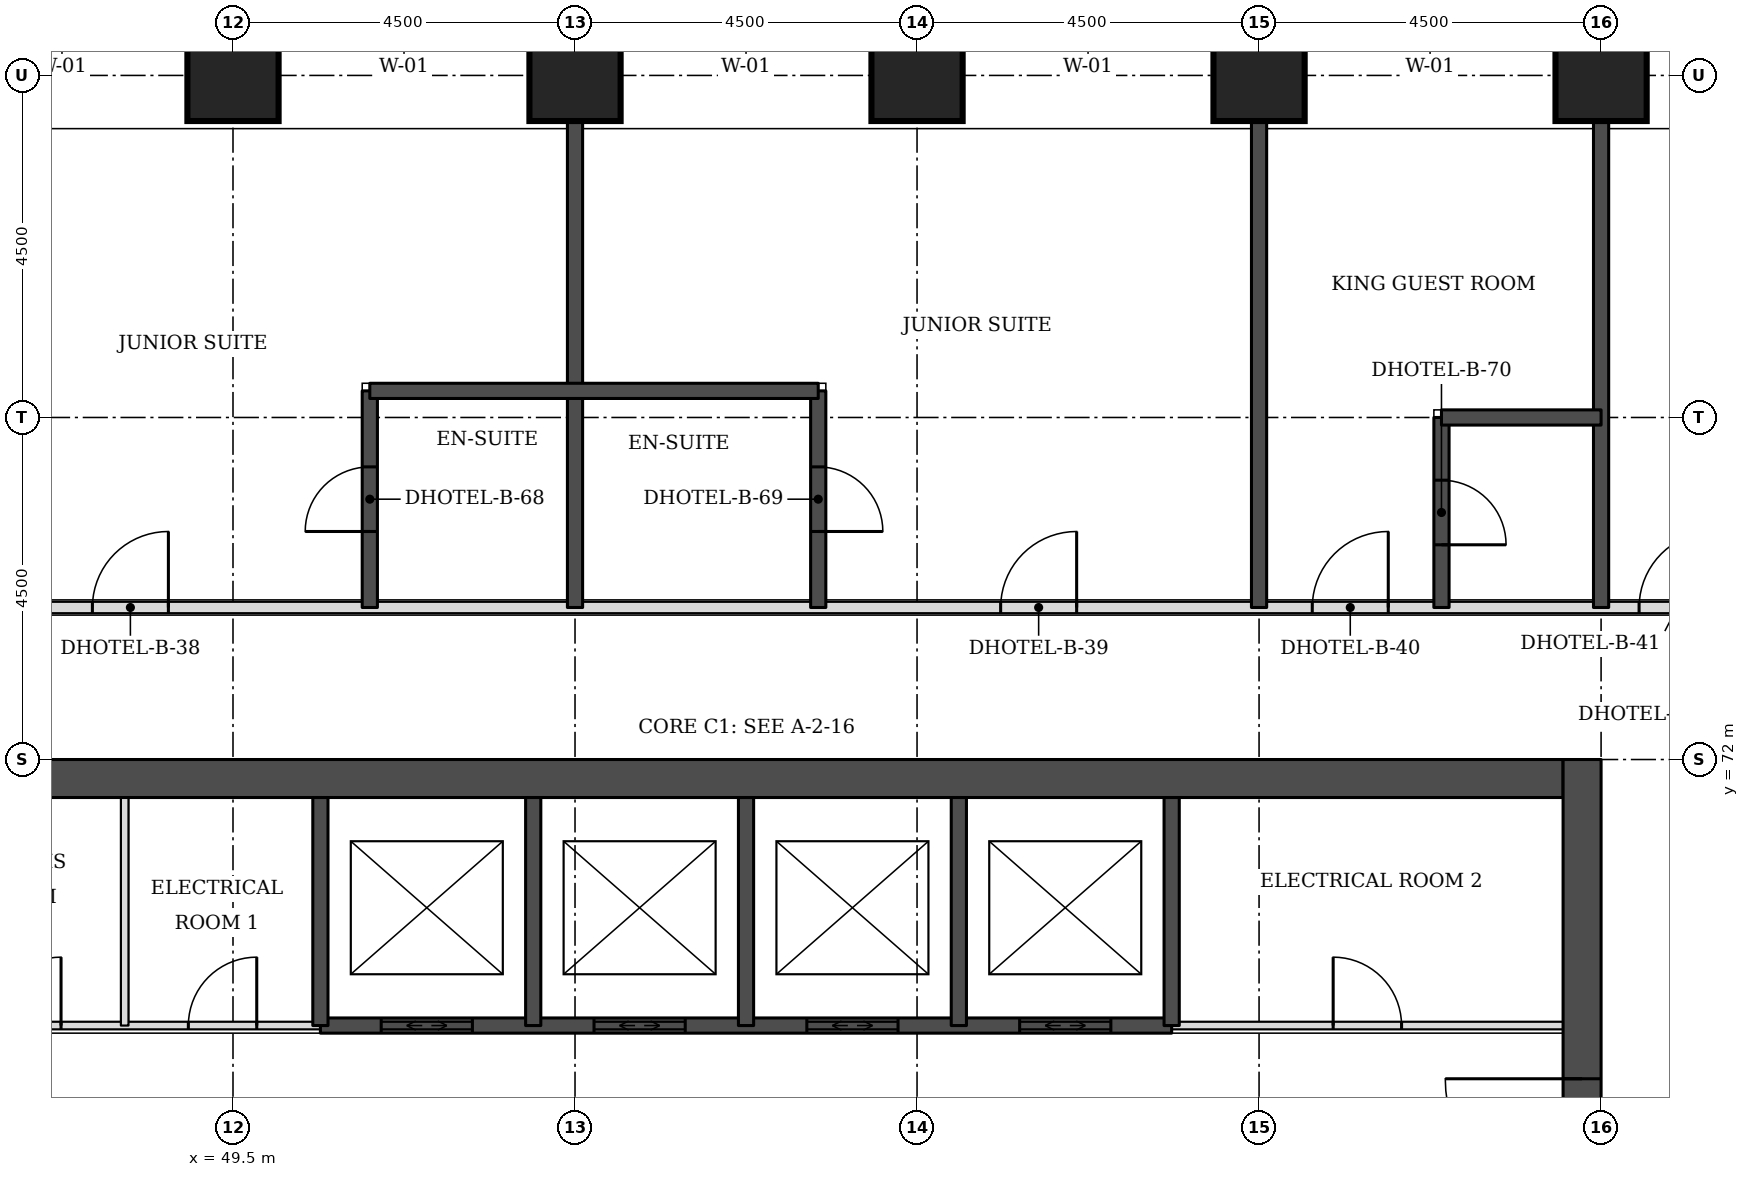
"""IFC4 building model, lengths in metres.
Left out: names, types, materials, properties, quantities, classifications, styles, units other than length and angle.
Written with IfcOpenShell. Run it as: python <this file> out.ifc"""

import sys

from ifc_helpers import new_model, si_unit, direction, frame, frame_2d, origin, origin_2d, place, context, subcontext, project, spatial, rectangle, extrude, element, fill, save


model = new_model("IFC4")
c1 = context("Model", 3, precision=1e-05, world=origin(), true_north=direction((0.0, 1.0)))
c2 = subcontext(c1, "Body", "Model", "MODEL_VIEW")
j1 = project(units=[si_unit("LENGTHUNIT", "METRE"), si_unit("PLANEANGLEUNIT", "RADIAN")], contexts=[c1])
p1 = place(None, origin())
s1 = spatial("IfcSite", under=j1, at=p1, CompositionType="ELEMENT")
p2 = place(p1, origin())
s2 = spatial("IfcBuilding", under=s1, at=p2, CompositionType="ELEMENT")
p3 = place(p2, frame((0.0, 0.0, 52.8)))
s3 = spatial("IfcBuildingStorey", under=s2, at=p3, CompositionType="ELEMENT", Elevation=52.8)
for number, where, z_axis, x_axis in (
    (1, (49.5, 81.0, 0.0), (0.0, 0.0, 1.0), (1.0, 0.0, 0.0)),
    (2, (54.0, 81.0, 0.0), (0.0, 0.0, 1.0), (1.0, 0.0, 0.0)),
    (3, (58.5, 81.0, 0.0), (0.0, 0.0, 1.0), (1.0, 0.0, 0.0)),
    (4, (63.0, 81.0, 0.0), (0.0, 0.0, 1.0), (1.0, 0.0, 0.0)),
    (5, (67.5, 81.0, 0.0), (0.0, 0.0, 1.0), (1.0, 0.0, 0.0)),
):
    element("IfcColumn", number, at=place(p3, frame(where, z_axis=z_axis, x_axis=x_axis)), inside=s3, PredefinedType="COLUMN", context=c2, shape_type="SweptSolid", body=[
        extrude(rectangle(XDim=1.2, YDim=1.2, at=origin_2d()), origin(), (0.0, 0.0, 1.0), 3.3),
    ])
p4 = place(p3, frame((45.5, 71.75, 0.0), z_axis=(0.0, 0.0, 1.0), x_axis=(1.0, 0.0, 0.0)))
e6 = element("IfcWall", 6, at=p4, inside=s3, PredefinedType="SHEAR", context=c2, shape_type="SweptSolid", body=[
    extrude(rectangle(XDim=21.5, YDim=0.5, at=frame_2d((10.75, 0.0))), origin(), (0.0, 0.0, 1.0), 3.3),
])
p5 = place(p3, frame((67.25, 49.5, 0.0), z_axis=(0.0, 0.0, 1.0), x_axis=(0.0, 1.0, 0.0)))
e7 = element("IfcWall", 7, at=p5, inside=s3, PredefinedType="SHEAR", context=c2, shape_type="SweptSolid", body=[
    extrude(rectangle(XDim=22.5, YDim=0.5, at=frame_2d((11.25, 0.0))), origin(), (0.0, 0.0, 1.0), 3.3),
])
p6 = place(p5, frame((4.2, 0.0, 0.0)))
e8 = element("IfcOpeningElement", 8, at=p6, cuts=e7, PredefinedType="OPENING", context=c2, shape_type="SweptSolid", body=[
    extrude(rectangle(XDim=1.8, YDim=2.1, at=frame_2d((0.9, 1.05))), frame((0.0, 0.26, 0.0), z_axis=(0.0, -1.0, 0.0), x_axis=(1.0, 0.0, 0.0)), (0.0, 0.0, 1.0), 0.52),
])
p7 = place(p5, frame((6.9, 0.0, 0.0)))
e9 = element("IfcOpeningElement", 9, at=p7, cuts=e7, PredefinedType="OPENING", context=c2, shape_type="SweptSolid", body=[
    extrude(rectangle(XDim=1.1, YDim=2.1, at=frame_2d((0.55, 1.05))), frame((0.0, 0.26, 0.0), z_axis=(0.0, -1.0, 0.0), x_axis=(1.0, 0.0, 0.0)), (0.0, 0.0, 1.0), 0.52),
])
p8 = place(p5, frame((13.6, 0.0, 0.0)))
e10 = element("IfcOpeningElement", 10, at=p8, cuts=e7, PredefinedType="OPENING", context=c2, shape_type="SweptSolid", body=[
    extrude(rectangle(XDim=1.1, YDim=2.1, at=frame_2d((0.55, 1.05))), frame((0.0, 0.26, 0.0), z_axis=(0.0, -1.0, 0.0), x_axis=(1.0, 0.0, 0.0)), (0.0, 0.0, 1.0), 0.52),
])
p9 = place(p5, frame((16.5, 0.0, 0.0)))
e11 = element("IfcOpeningElement", 11, at=p9, cuts=e7, PredefinedType="OPENING", context=c2, shape_type="SweptSolid", body=[
    extrude(rectangle(XDim=1.8, YDim=2.1, at=frame_2d((0.9, 1.05))), frame((0.0, 0.26, 0.0), z_axis=(0.0, -1.0, 0.0), x_axis=(1.0, 0.0, 0.0)), (0.0, 0.0, 1.0), 0.52),
])
p10 = place(p3, frame((43.0, 74.0, 0.0), z_axis=(0.0, 0.0, 1.0), x_axis=(1.0, 0.0, 0.0)))
e12 = element("IfcWall", 12, at=p10, inside=s3, PredefinedType="PARTITIONING", context=c2, shape_type="SweptSolid", body=[
    extrude(rectangle(XDim=26.5, YDim=0.15, at=frame_2d((13.25, 0.0))), origin(), (0.0, 0.0, 1.0), 3.08),
])
p11 = place(p10, frame((4.65, 0.0, 0.0)))
e13 = element("IfcOpeningElement", 13, at=p11, cuts=e12, PredefinedType="OPENING", context=c2, shape_type="SweptSolid", body=[
    extrude(rectangle(XDim=1.0, YDim=2.1, at=frame_2d((0.5, 1.05))), frame((0.0, 0.085, 0.0), z_axis=(0.0, -1.0, 0.0), x_axis=(1.0, 0.0, 0.0)), (0.0, 0.0, 1.0), 0.17),
])
p12 = place(p10, frame((16.6, 0.0, 0.0)))
e14 = element("IfcOpeningElement", 14, at=p12, cuts=e12, PredefinedType="OPENING", context=c2, shape_type="SweptSolid", body=[
    extrude(rectangle(XDim=1.0, YDim=2.1, at=frame_2d((0.5, 1.05))), frame((0.0, 0.085, 0.0), z_axis=(0.0, -1.0, 0.0), x_axis=(1.0, 0.0, 0.0)), (0.0, 0.0, 1.0), 0.17),
])
p13 = place(p10, frame((20.7, 0.0, 0.0)))
e15 = element("IfcOpeningElement", 15, at=p13, cuts=e12, PredefinedType="OPENING", context=c2, shape_type="SweptSolid", body=[
    extrude(rectangle(XDim=1.0, YDim=2.1, at=frame_2d((0.5, 1.05))), frame((0.0, 0.085, 0.0), z_axis=(0.0, -1.0, 0.0), x_axis=(1.0, 0.0, 0.0)), (0.0, 0.0, 1.0), 0.17),
])
p14 = place(p10, frame((0.5, 0.0, 0.0)))
e16 = element("IfcOpeningElement", 16, at=p14, cuts=e12, PredefinedType="OPENING", context=c2, shape_type="SweptSolid", body=[
    extrude(rectangle(XDim=1.0, YDim=2.1, at=frame_2d((0.5, 1.05))), frame((0.0, 0.085, 0.0), z_axis=(0.0, -1.0, 0.0), x_axis=(1.0, 0.0, 0.0)), (0.0, 0.0, 1.0), 0.17),
])
p15 = place(p10, frame((25.0, 0.0, 0.0)))
e17 = element("IfcOpeningElement", 17, at=p15, cuts=e12, PredefinedType="OPENING", context=c2, shape_type="SweptSolid", body=[
    extrude(rectangle(XDim=1.0, YDim=2.1, at=frame_2d((0.5, 1.05))), frame((0.0, 0.085, 0.0), z_axis=(0.0, -1.0, 0.0), x_axis=(1.0, 0.0, 0.0)), (0.0, 0.0, 1.0), 0.17),
])
p16 = place(p3, frame((51.3, 74.0, 0.0), z_axis=(0.0, 0.0, 1.0), x_axis=(0.0, 1.0, 0.0)))
e18 = element("IfcWall", 18, at=p16, inside=s3, PredefinedType="SOLIDWALL", context=c2, shape_type="SweptSolid", body=[
    extrude(rectangle(XDim=2.85, YDim=0.2, at=frame_2d((1.425, 0.0))), origin(), (0.0, 0.0, 1.0), 3.08),
])
p17 = place(p16, frame((1.0, 0.0, 0.0)))
e19 = element("IfcOpeningElement", 19, at=p17, cuts=e18, PredefinedType="OPENING", context=c2, shape_type="SweptSolid", body=[
    extrude(rectangle(XDim=0.85, YDim=2.1, at=frame_2d((0.425, 1.05))), frame((0.0, 0.11, 0.0), z_axis=(0.0, -1.0, 0.0), x_axis=(1.0, 0.0, 0.0)), (0.0, 0.0, 1.0), 0.22),
])
p18 = place(p3, frame((54.0, 74.0, 0.0), z_axis=(0.0, 0.0, 1.0), x_axis=(0.0, 1.0, 0.0)))
e20 = element("IfcWall", 20, at=p18, inside=s3, PredefinedType="SOLIDWALL", context=c2, shape_type="SweptSolid", body=[
    extrude(rectangle(XDim=6.4, YDim=0.2, at=frame_2d((3.2, 0.0))), origin(), (0.0, 0.0, 1.0), 3.08),
])
p19 = place(p3, frame((57.2, 74.0, 0.0), z_axis=(0.0, 0.0, 1.0), x_axis=(0.0, 1.0, 0.0)))
e21 = element("IfcWall", 21, at=p19, inside=s3, PredefinedType="SOLIDWALL", context=c2, shape_type="SweptSolid", body=[
    extrude(rectangle(XDim=2.85, YDim=0.2, at=frame_2d((1.425, 0.0))), origin(), (0.0, 0.0, 1.0), 3.08),
])
p20 = place(p19, frame((1.0, 0.0, 0.0)))
e22 = element("IfcOpeningElement", 22, at=p20, cuts=e21, PredefinedType="OPENING", context=c2, shape_type="SweptSolid", body=[
    extrude(rectangle(XDim=0.85, YDim=2.1, at=frame_2d((0.425, 1.05))), frame((0.0, 0.11, 0.0), z_axis=(0.0, -1.0, 0.0), x_axis=(1.0, 0.0, 0.0)), (0.0, 0.0, 1.0), 0.22),
])
p21 = place(p3, frame((63.0, 74.0, 0.0), z_axis=(0.0, 0.0, 1.0), x_axis=(0.0, 1.0, 0.0)))
e23 = element("IfcWall", 23, at=p21, inside=s3, PredefinedType="SOLIDWALL", context=c2, shape_type="SweptSolid", body=[
    extrude(rectangle(XDim=6.4, YDim=0.2, at=frame_2d((3.2, 0.0))), origin(), (0.0, 0.0, 1.0), 3.08),
])
p22 = place(p3, frame((65.4, 74.0, 0.0), z_axis=(0.0, 0.0, 1.0), x_axis=(0.0, 1.0, 0.0)))
e24 = element("IfcWall", 24, at=p22, inside=s3, PredefinedType="SOLIDWALL", context=c2, shape_type="SweptSolid", body=[
    extrude(rectangle(XDim=2.5, YDim=0.2, at=frame_2d((1.25, 0.0))), origin(), (0.0, 0.0, 1.0), 3.08),
])
p23 = place(p22, frame((0.825, 0.0, 0.0)))
e25 = element("IfcOpeningElement", 25, at=p23, cuts=e24, PredefinedType="OPENING", context=c2, shape_type="SweptSolid", body=[
    extrude(rectangle(XDim=0.85, YDim=2.1, at=frame_2d((0.425, 1.05))), frame((0.0, 0.11, 0.0), z_axis=(0.0, -1.0, 0.0), x_axis=(1.0, 0.0, 0.0)), (0.0, 0.0, 1.0), 0.22),
])
p24 = place(p3, frame((67.5, 74.0, 0.0), z_axis=(0.0, 0.0, 1.0), x_axis=(0.0, 1.0, 0.0)))
e26 = element("IfcWall", 26, at=p24, inside=s3, PredefinedType="SOLIDWALL", context=c2, shape_type="SweptSolid", body=[
    extrude(rectangle(XDim=6.4, YDim=0.2, at=frame_2d((3.2, 0.0))), origin(), (0.0, 0.0, 1.0), 3.08),
])
p25 = place(p3, frame((65.4, 76.5, 0.0), z_axis=(0.0, 0.0, 1.0), x_axis=(1.0, 0.0, 0.0)))
e27 = element("IfcWall", 27, at=p25, inside=s3, PredefinedType="SOLIDWALL", context=c2, shape_type="SweptSolid", body=[
    extrude(rectangle(XDim=2.1, YDim=0.2, at=frame_2d((1.05, 0.0))), origin(), (0.0, 0.0, 1.0), 3.08),
])
p26 = place(p3, frame((51.3, 76.85, 0.0), z_axis=(0.0, 0.0, 1.0), x_axis=(1.0, 0.0, 0.0)))
e28 = element("IfcWall", 28, at=p26, inside=s3, PredefinedType="SOLIDWALL", context=c2, shape_type="SweptSolid", body=[
    extrude(rectangle(XDim=5.9, YDim=0.2, at=frame_2d((2.95, 0.0))), origin(), (0.0, 0.0, 1.0), 3.08),
])
p27 = place(p3, frame((45.5, 68.5, 0.0), z_axis=(0.0, 0.0, 1.0), x_axis=(1.0, 0.0, 0.0)))
e29 = element("IfcWall", 29, at=p27, inside=s3, PredefinedType="PARTITIONING", context=c2, shape_type="SweptSolid", body=[
    extrude(rectangle(XDim=5.15, YDim=0.1, at=frame_2d((2.575, 0.0))), origin(), (0.0, 0.0, 1.0), 3.08),
])
p28 = place(p27, frame((0.837, 0.0, 0.0)))
e30 = element("IfcOpeningElement", 30, at=p28, cuts=e29, PredefinedType="OPENING", context=c2, shape_type="SweptSolid", body=[
    extrude(rectangle(XDim=0.9, YDim=2.1, at=frame_2d((0.45, 1.05))), frame((0.0, 0.06, 0.0), z_axis=(0.0, -1.0, 0.0), x_axis=(1.0, 0.0, 0.0)), (0.0, 0.0, 1.0), 0.12),
])
p29 = place(p27, frame((3.413, 0.0, 0.0)))
e31 = element("IfcOpeningElement", 31, at=p29, cuts=e29, PredefinedType="OPENING", context=c2, shape_type="SweptSolid", body=[
    extrude(rectangle(XDim=0.9, YDim=2.1, at=frame_2d((0.45, 1.05))), frame((0.0, 0.06, 0.0), z_axis=(0.0, -1.0, 0.0), x_axis=(1.0, 0.0, 0.0)), (0.0, 0.0, 1.0), 0.12),
])
p30 = place(p3, frame((61.85, 68.5, 0.0), z_axis=(0.0, 0.0, 1.0), x_axis=(1.0, 0.0, 0.0)))
e32 = element("IfcWall", 32, at=p30, inside=s3, PredefinedType="PARTITIONING", context=c2, shape_type="SweptSolid", body=[
    extrude(rectangle(XDim=5.15, YDim=0.1, at=frame_2d((2.575, 0.0))), origin(), (0.0, 0.0, 1.0), 3.08),
])
p31 = place(p30, frame((2.125, 0.0, 0.0)))
e33 = element("IfcOpeningElement", 33, at=p31, cuts=e32, PredefinedType="OPENING", context=c2, shape_type="SweptSolid", body=[
    extrude(rectangle(XDim=0.9, YDim=2.1, at=frame_2d((0.45, 1.05))), frame((0.0, 0.06, 0.0), z_axis=(0.0, -1.0, 0.0), x_axis=(1.0, 0.0, 0.0)), (0.0, 0.0, 1.0), 0.12),
])
p32 = place(p3, frame((50.65, 68.5, 0.0), z_axis=(0.0, 0.0, 1.0), x_axis=(1.0, 0.0, 0.0)))
e34 = element("IfcWall", 34, at=p32, inside=s3, PredefinedType="SOLIDWALL", context=c2, shape_type="SweptSolid", body=[
    extrude(rectangle(XDim=11.2, YDim=0.2, at=frame_2d((5.6, 0.0))), origin(), (0.0, 0.0, 1.0), 3.08),
])
p33 = place(p32, frame((0.8, 0.0, 0.0)))
e35 = element("IfcOpeningElement", 35, at=p33, cuts=e34, PredefinedType="OPENING", context=c2, shape_type="SweptSolid", body=[
    extrude(rectangle(XDim=1.2, YDim=2.1, at=frame_2d((0.6, 1.05))), frame((0.0, 0.11, 0.0), z_axis=(0.0, -1.0, 0.0), x_axis=(1.0, 0.0, 0.0)), (0.0, 0.0, 1.0), 0.22),
])
p34 = place(p32, frame((3.6, 0.0, 0.0)))
e36 = element("IfcOpeningElement", 36, at=p34, cuts=e34, PredefinedType="OPENING", context=c2, shape_type="SweptSolid", body=[
    extrude(rectangle(XDim=1.2, YDim=2.1, at=frame_2d((0.6, 1.05))), frame((0.0, 0.11, 0.0), z_axis=(0.0, -1.0, 0.0), x_axis=(1.0, 0.0, 0.0)), (0.0, 0.0, 1.0), 0.22),
])
p35 = place(p32, frame((6.4, 0.0, 0.0)))
e37 = element("IfcOpeningElement", 37, at=p35, cuts=e34, PredefinedType="OPENING", context=c2, shape_type="SweptSolid", body=[
    extrude(rectangle(XDim=1.2, YDim=2.1, at=frame_2d((0.6, 1.05))), frame((0.0, 0.11, 0.0), z_axis=(0.0, -1.0, 0.0), x_axis=(1.0, 0.0, 0.0)), (0.0, 0.0, 1.0), 0.22),
])
p36 = place(p32, frame((9.2, 0.0, 0.0)))
e38 = element("IfcOpeningElement", 38, at=p36, cuts=e34, PredefinedType="OPENING", context=c2, shape_type="SweptSolid", body=[
    extrude(rectangle(XDim=1.2, YDim=2.1, at=frame_2d((0.6, 1.05))), frame((0.0, 0.11, 0.0), z_axis=(0.0, -1.0, 0.0), x_axis=(1.0, 0.0, 0.0)), (0.0, 0.0, 1.0), 0.22),
])
p37 = place(p3, frame((48.075, 68.5, 0.0), z_axis=(0.0, 0.0, 1.0), x_axis=(0.0, 1.0, 0.0)))
e39 = element("IfcWall", 39, at=p37, inside=s3, PredefinedType="PARTITIONING", context=c2, shape_type="SweptSolid", body=[
    extrude(rectangle(XDim=3.0, YDim=0.1, at=frame_2d((1.5, 0.0))), origin(), (0.0, 0.0, 1.0), 3.08),
])
for number, where, z_axis, x_axis in (
    (40, (50.65, 68.5, 0.0), (0.0, 0.0, 1.0), (0.0, 1.0, 0.0)),
    (41, (53.45, 68.5, 0.0), (0.0, 0.0, 1.0), (0.0, 1.0, 0.0)),
    (42, (56.25, 68.5, 0.0), (0.0, 0.0, 1.0), (0.0, 1.0, 0.0)),
    (43, (59.05, 68.5, 0.0), (0.0, 0.0, 1.0), (0.0, 1.0, 0.0)),
    (44, (61.85, 68.5, 0.0), (0.0, 0.0, 1.0), (0.0, 1.0, 0.0)),
):
    element("IfcWall", number, at=place(p3, frame(where, z_axis=z_axis, x_axis=x_axis)), inside=s3, PredefinedType="SOLIDWALL", context=c2, shape_type="SweptSolid", body=[
        extrude(rectangle(XDim=3.0, YDim=0.2, at=frame_2d((1.5, 0.0))), origin(), (0.0, 0.0, 1.0), 3.08),
    ])
p38 = place(p11, origin())
e45 = element("IfcDoor", 45, at=p38, inside=s3, OperationType="SINGLE_SWING_RIGHT", PredefinedType="DOOR", context=c2, shape_type="SweptSolid", body=[
    extrude(rectangle(XDim=1.0, YDim=2.1, at=frame_2d((0.5, 1.05))), frame((0.0, 0.025, 0.0), z_axis=(0.0, -1.0, 0.0), x_axis=(1.0, 0.0, 0.0)), (0.0, 0.0, 1.0), 0.05),
])
fill(e13, e45)
p39 = place(p17, origin())
e46 = element("IfcDoor", 46, at=p39, inside=s3, OperationType="SINGLE_SWING_LEFT", PredefinedType="DOOR", context=c2, shape_type="SweptSolid", body=[
    extrude(rectangle(XDim=0.85, YDim=2.1, at=frame_2d((0.425, 1.05))), frame((0.0, 0.025, 0.0), z_axis=(0.0, -1.0, 0.0), x_axis=(1.0, 0.0, 0.0)), (0.0, 0.0, 1.0), 0.05),
])
fill(e19, e46)
p40 = place(p12, origin())
e47 = element("IfcDoor", 47, at=p40, inside=s3, OperationType="SINGLE_SWING_RIGHT", PredefinedType="DOOR", context=c2, shape_type="SweptSolid", body=[
    extrude(rectangle(XDim=1.0, YDim=2.1, at=frame_2d((0.5, 1.05))), frame((0.0, 0.025, 0.0), z_axis=(0.0, -1.0, 0.0), x_axis=(1.0, 0.0, 0.0)), (0.0, 0.0, 1.0), 0.05),
])
fill(e14, e47)
p41 = place(p20, frame((0.85, 0.0, 0.0), z_axis=(0.0, 0.0, 1.0), x_axis=(-1.0, 0.0, 0.0)))
e48 = element("IfcDoor", 48, at=p41, inside=s3, OperationType="SINGLE_SWING_RIGHT", PredefinedType="DOOR", context=c2, shape_type="SweptSolid", body=[
    extrude(rectangle(XDim=0.85, YDim=2.1, at=frame_2d((0.425, 1.05))), frame((0.0, 0.025, 0.0), z_axis=(0.0, -1.0, 0.0), x_axis=(1.0, 0.0, 0.0)), (0.0, 0.0, 1.0), 0.05),
])
fill(e22, e48)
p42 = place(p13, origin())
e49 = element("IfcDoor", 49, at=p42, inside=s3, OperationType="SINGLE_SWING_RIGHT", PredefinedType="DOOR", context=c2, shape_type="SweptSolid", body=[
    extrude(rectangle(XDim=1.0, YDim=2.1, at=frame_2d((0.5, 1.05))), frame((0.0, 0.025, 0.0), z_axis=(0.0, -1.0, 0.0), x_axis=(1.0, 0.0, 0.0)), (0.0, 0.0, 1.0), 0.05),
])
fill(e15, e49)
p43 = place(p23, frame((0.85, 0.0, 0.0), z_axis=(0.0, 0.0, 1.0), x_axis=(-1.0, 0.0, 0.0)))
e50 = element("IfcDoor", 50, at=p43, inside=s3, OperationType="SINGLE_SWING_RIGHT", PredefinedType="DOOR", context=c2, shape_type="SweptSolid", body=[
    extrude(rectangle(XDim=0.85, YDim=2.1, at=frame_2d((0.425, 1.05))), frame((0.0, 0.025, 0.0), z_axis=(0.0, -1.0, 0.0), x_axis=(1.0, 0.0, 0.0)), (0.0, 0.0, 1.0), 0.05),
])
fill(e25, e50)
p44 = place(p15, origin())
e51 = element("IfcDoor", 51, at=p44, inside=s3, OperationType="SINGLE_SWING_RIGHT", PredefinedType="DOOR", context=c2, shape_type="SweptSolid", body=[
    extrude(rectangle(XDim=1.0, YDim=2.1, at=frame_2d((0.5, 1.05))), frame((0.0, 0.025, 0.0), z_axis=(0.0, -1.0, 0.0), x_axis=(1.0, 0.0, 0.0)), (0.0, 0.0, 1.0), 0.05),
])
fill(e17, e51)
p45 = place(p33, origin())
e52 = element("IfcDoor", 52, at=p45, inside=s3, OperationType="DOUBLE_DOOR_SLIDING", PredefinedType="DOOR", context=c2, shape_type="SweptSolid", body=[
    extrude(rectangle(XDim=1.2, YDim=2.1, at=frame_2d((0.6, 1.05))), frame((0.0, 0.025, 0.0), z_axis=(0.0, -1.0, 0.0), x_axis=(1.0, 0.0, 0.0)), (0.0, 0.0, 1.0), 0.05),
])
fill(e35, e52)
p46 = place(p34, origin())
e53 = element("IfcDoor", 53, at=p46, inside=s3, OperationType="DOUBLE_DOOR_SLIDING", PredefinedType="DOOR", context=c2, shape_type="SweptSolid", body=[
    extrude(rectangle(XDim=1.2, YDim=2.1, at=frame_2d((0.6, 1.05))), frame((0.0, 0.025, 0.0), z_axis=(0.0, -1.0, 0.0), x_axis=(1.0, 0.0, 0.0)), (0.0, 0.0, 1.0), 0.05),
])
fill(e36, e53)
p47 = place(p35, origin())
e54 = element("IfcDoor", 54, at=p47, inside=s3, OperationType="DOUBLE_DOOR_SLIDING", PredefinedType="DOOR", context=c2, shape_type="SweptSolid", body=[
    extrude(rectangle(XDim=1.2, YDim=2.1, at=frame_2d((0.6, 1.05))), frame((0.0, 0.025, 0.0), z_axis=(0.0, -1.0, 0.0), x_axis=(1.0, 0.0, 0.0)), (0.0, 0.0, 1.0), 0.05),
])
fill(e37, e54)
p48 = place(p36, origin())
e55 = element("IfcDoor", 55, at=p48, inside=s3, OperationType="DOUBLE_DOOR_SLIDING", PredefinedType="DOOR", context=c2, shape_type="SweptSolid", body=[
    extrude(rectangle(XDim=1.2, YDim=2.1, at=frame_2d((0.6, 1.05))), frame((0.0, 0.025, 0.0), z_axis=(0.0, -1.0, 0.0), x_axis=(1.0, 0.0, 0.0)), (0.0, 0.0, 1.0), 0.05),
])
fill(e38, e55)
p49 = place(p9, origin())
e56 = element("IfcDoor", 56, at=p49, inside=s3, OperationType="SINGLE_SWING_RIGHT", PredefinedType="DOOR", context=c2, shape_type="SweptSolid", body=[
    extrude(rectangle(XDim=1.8, YDim=2.1, at=frame_2d((0.9, 1.05))), frame((0.0, 0.025, 0.0), z_axis=(0.0, -1.0, 0.0), x_axis=(1.0, 0.0, 0.0)), (0.0, 0.0, 1.0), 0.05),
])
fill(e11, e56)
p50 = place(p31, origin())
e57 = element("IfcDoor", 57, at=p50, inside=s3, OperationType="SINGLE_SWING_LEFT", PredefinedType="DOOR", context=c2, shape_type="SweptSolid", body=[
    extrude(rectangle(XDim=0.9, YDim=2.1, at=frame_2d((0.45, 1.05))), frame((0.0, 0.025, 0.0), z_axis=(0.0, -1.0, 0.0), x_axis=(1.0, 0.0, 0.0)), (0.0, 0.0, 1.0), 0.05),
])
fill(e33, e57)
p51 = place(p28, origin())
e58 = element("IfcDoor", 58, at=p51, inside=s3, OperationType="SINGLE_SWING_RIGHT", PredefinedType="DOOR", context=c2, shape_type="SweptSolid", body=[
    extrude(rectangle(XDim=0.9, YDim=2.1, at=frame_2d((0.45, 1.05))), frame((0.0, 0.025, 0.0), z_axis=(0.0, -1.0, 0.0), x_axis=(1.0, 0.0, 0.0)), (0.0, 0.0, 1.0), 0.05),
])
fill(e30, e58)
p52 = place(p29, origin())
e59 = element("IfcDoor", 59, at=p52, inside=s3, OperationType="SINGLE_SWING_RIGHT", PredefinedType="DOOR", context=c2, shape_type="SweptSolid", body=[
    extrude(rectangle(XDim=0.9, YDim=2.1, at=frame_2d((0.45, 1.05))), frame((0.0, 0.025, 0.0), z_axis=(0.0, -1.0, 0.0), x_axis=(1.0, 0.0, 0.0)), (0.0, 0.0, 1.0), 0.05),
])
fill(e31, e59)
save(model, sys.argv[1])
